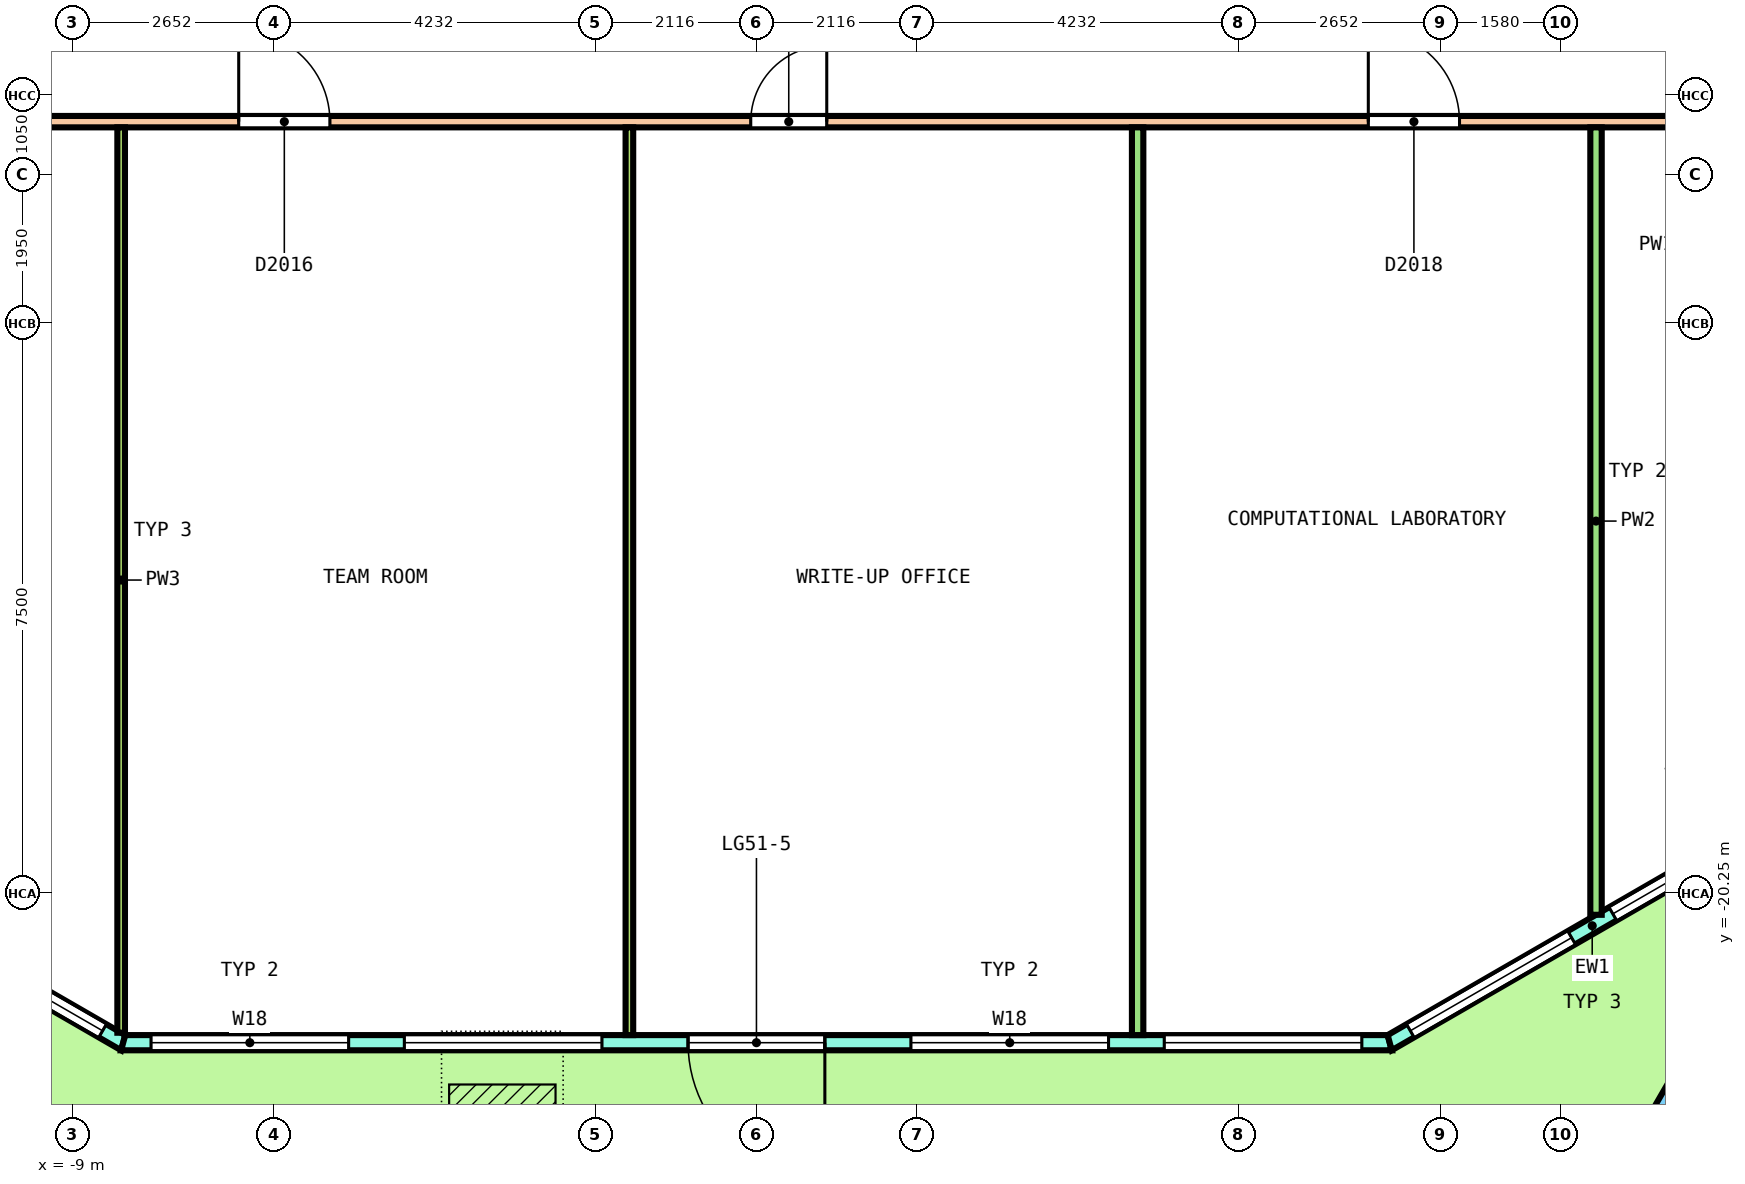
"""IFC4 building model, lengths in metres.
Left out: names, types, materials, properties, quantities, classifications, styles, units other than length and angle.
Written with IfcOpenShell. Run it as: python <this file> out.ifc"""

import sys

from ifc_helpers import new_model, si_unit, direction, frame, frame_2d, origin, origin_2d, place, context, subcontext, project, spatial, polyline, rectangle, outline, extrude, element, fill, save


model = new_model("IFC4")
c1 = context("Model", 3, precision=1e-05, world=origin(), true_north=direction((0.0, 1.0)))
c2 = subcontext(c1, "Body", "Model", "MODEL_VIEW")
j1 = project(units=[si_unit("LENGTHUNIT", "METRE"), si_unit("PLANEANGLEUNIT", "RADIAN")], contexts=[c1])
p1 = place(None, origin())
s1 = spatial("IfcSite", under=j1, at=p1, CompositionType="ELEMENT")
p2 = place(p1, origin())
s2 = spatial("IfcBuilding", under=s1, at=p2, CompositionType="ELEMENT")
p3 = place(p2, frame((0.0, 0.0, 237.4)))
s3 = spatial("IfcBuildingStorey", under=s2, at=p3, CompositionType="ELEMENT", Elevation=237.4)
p4 = place(p3, frame((12.396, -23.104, 0.0), z_axis=(-0.018113955825, -0.03141534774, 0.999342263957), x_axis=(0.86551973078, 0.499889444942, 0.031402841694)))
e1 = element("IfcColumn", 1, at=p4, inside=s3, PredefinedType="COLUMN", context=c2, shape_type="SweptSolid", body=[
    extrude(rectangle(XDim=1.05, YDim=1.05, at=origin_2d()), origin(), (0.0, 0.0, 1.0), 3.653),
])
p5 = place(p3, frame((-13.66, -19.141, 0.0), z_axis=(0.0, 0.0, 1.0), x_axis=(0.866019727221, -0.500009831968, 0.0)))
e2 = element("IfcWall", 2, at=p5, inside=s3, PredefinedType="SOLIDWALL", context=c2, shape_type="SweptSolid", body=[
    extrude(outline(polyline([(-0.027, -0.1), (1.008, -0.1), (2.042, -0.1), (3.076, -0.1), (4.111, -0.1), (5.145, -0.1), (6.18, -0.1), (6.126, 0.1), (5.109, 0.1), (4.093, 0.1), (3.076, 0.1), (2.06, 0.1), (1.043, 0.1), (0.027, 0.1), (-0.027, -0.1)])), origin(), (0.0, 0.0, 1.0), 3.7),
])
p6 = place(p5, frame((0.313, 0.0, 0.1)))
e3 = element("IfcOpeningElement", 3, at=p6, cuts=e2, PredefinedType="OPENING", context=c2, shape_type="SweptSolid", body=[
    extrude(rectangle(XDim=2.45, YDim=2.65, at=frame_2d((1.225, 1.325))), frame((0.0, 0.11, 0.0), z_axis=(0.0, -1.0, 0.0), x_axis=(1.0, 0.0, 0.0)), (0.0, 0.0, 1.0), 0.22),
])
p7 = place(p5, frame((3.39, 0.0, 0.1)))
e4 = element("IfcOpeningElement", 4, at=p7, cuts=e2, PredefinedType="OPENING", context=c2, shape_type="SweptSolid", body=[
    extrude(rectangle(XDim=2.45, YDim=2.65, at=frame_2d((1.225, 1.325))), frame((0.0, 0.11, 0.0), z_axis=(0.0, -1.0, 0.0), x_axis=(1.0, 0.0, 0.0)), (0.0, 0.0, 1.0), 0.22),
])
p8 = place(p3, frame((-8.331, -22.217, 0.0), z_axis=(0.0, 0.0, 1.0), x_axis=(1.0, 0.0, 0.0)))
e5 = element("IfcWall", 5, at=p8, inside=s3, PredefinedType="SOLIDWALL", context=c2, shape_type="SweptSolid", body=[
    extrude(outline(polyline([(-0.027, -0.1), (1.018, -0.1), (2.063, -0.1), (3.107, -0.1), (4.152, -0.1), (5.197, -0.1), (6.242, -0.1), (7.287, -0.1), (8.331, -0.1), (9.376, -0.1), (10.421, -0.1), (11.466, -0.1), (12.51, -0.1), (13.555, -0.1), (14.6, -0.1), (15.645, -0.1), (16.689, -0.1), (16.636, 0.1), (15.598, 0.1), (14.56, 0.1), (13.521, 0.1), (12.483, 0.1), (11.446, 0.1), (10.407, 0.1), (9.369, 0.1), (8.331, 0.1), (7.293, 0.1), (6.255, 0.1), (5.217, 0.1), (4.179, 0.1), (3.141, 0.1), (2.103, 0.1), (1.065, 0.1), (0.027, 0.1), (-0.027, -0.1)])), origin(), (0.0, 0.0, 1.0), 3.7),
])
p9 = place(p8, frame((0.366, 0.0, 0.1)))
e6 = element("IfcOpeningElement", 6, at=p9, cuts=e5, PredefinedType="OPENING", context=c2, shape_type="SweptSolid", body=[
    extrude(rectangle(XDim=2.6, YDim=2.65, at=frame_2d((1.3, 1.325))), frame((0.0, 0.11, 0.0), z_axis=(0.0, -1.0, 0.0), x_axis=(1.0, 0.0, 0.0)), (0.0, 0.0, 1.0), 0.22),
])
p10 = place(p8, frame((3.699, 0.0, 0.1)))
e7 = element("IfcOpeningElement", 7, at=p10, cuts=e5, PredefinedType="OPENING", context=c2, shape_type="SweptSolid", body=[
    extrude(rectangle(XDim=2.6, YDim=2.65, at=frame_2d((1.3, 1.325))), frame((0.0, 0.11, 0.0), z_axis=(0.0, -1.0, 0.0), x_axis=(1.0, 0.0, 0.0)), (0.0, 0.0, 1.0), 0.22),
])
p11 = place(p8, frame((7.431, 0.0, 0.0)))
e8 = element("IfcOpeningElement", 8, at=p11, cuts=e5, PredefinedType="OPENING", context=c2, shape_type="SweptSolid", body=[
    extrude(rectangle(XDim=1.8, YDim=2.4, at=frame_2d((0.9, 1.2))), frame((0.0, 0.11, 0.0), z_axis=(0.0, -1.0, 0.0), x_axis=(1.0, 0.0, 0.0)), (0.0, 0.0, 1.0), 0.22),
])
p12 = place(p8, frame((7.431, 0.0, 2.55)))
e9 = element("IfcOpeningElement", 9, at=p12, cuts=e5, PredefinedType="OPENING", context=c2, shape_type="SweptSolid", body=[
    extrude(rectangle(XDim=1.8, YDim=0.2, at=frame_2d((0.9, 0.1))), frame((0.0, 0.11, 0.0), z_axis=(0.0, -1.0, 0.0), x_axis=(1.0, 0.0, 0.0)), (0.0, 0.0, 1.0), 0.22),
])
p13 = place(p8, frame((10.364, 0.0, 0.1)))
e10 = element("IfcOpeningElement", 10, at=p13, cuts=e5, PredefinedType="OPENING", context=c2, shape_type="SweptSolid", body=[
    extrude(rectangle(XDim=2.6, YDim=2.65, at=frame_2d((1.3, 1.325))), frame((0.0, 0.11, 0.0), z_axis=(0.0, -1.0, 0.0), x_axis=(1.0, 0.0, 0.0)), (0.0, 0.0, 1.0), 0.22),
])
p14 = place(p8, frame((13.696, 0.0, 0.1)))
e11 = element("IfcOpeningElement", 11, at=p14, cuts=e5, PredefinedType="OPENING", context=c2, shape_type="SweptSolid", body=[
    extrude(rectangle(XDim=2.6, YDim=2.65, at=frame_2d((1.3, 1.325))), frame((0.0, 0.11, 0.0), z_axis=(0.0, -1.0, 0.0), x_axis=(1.0, 0.0, 0.0)), (0.0, 0.0, 1.0), 0.22),
])
p15 = place(p3, frame((8.331, -22.217, 0.0), z_axis=(0.0, 0.0, 1.0), x_axis=(0.866019727221, 0.500009831968, 0.0)))
e12 = element("IfcWall", 12, at=p15, inside=s3, PredefinedType="SOLIDWALL", context=c2, shape_type="SweptSolid", body=[
    extrude(outline(polyline([(-0.027, -0.1), (1.008, -0.1), (2.042, -0.1), (3.076, -0.1), (4.111, -0.1), (5.145, -0.1), (6.18, -0.1), (6.126, 0.1), (5.109, 0.1), (4.093, 0.1), (3.076, 0.1), (2.06, 0.1), (1.043, 0.1), (0.027, 0.1), (-0.027, -0.1)])), origin(), (0.0, 0.0, 1.0), 3.7),
])
p16 = place(p15, frame((0.313, 0.0, 0.1)))
e13 = element("IfcOpeningElement", 13, at=p16, cuts=e12, PredefinedType="OPENING", context=c2, shape_type="SweptSolid", body=[
    extrude(rectangle(XDim=2.45, YDim=2.65, at=frame_2d((1.225, 1.325))), frame((0.0, 0.11, 0.0), z_axis=(0.0, -1.0, 0.0), x_axis=(1.0, 0.0, 0.0)), (0.0, 0.0, 1.0), 0.22),
])
p17 = place(p15, frame((3.39, 0.0, 0.1)))
e14 = element("IfcOpeningElement", 14, at=p17, cuts=e12, PredefinedType="OPENING", context=c2, shape_type="SweptSolid", body=[
    extrude(rectangle(XDim=2.45, YDim=2.65, at=frame_2d((1.225, 1.325))), frame((0.0, 0.11, 0.0), z_axis=(0.0, -1.0, 0.0), x_axis=(1.0, 0.0, 0.0)), (0.0, 0.0, 1.0), 0.22),
])
p18 = place(p3, frame((-15.275, -10.1, 0.0), z_axis=(0.0, 0.0, 1.0), x_axis=(1.0, 0.0, 0.0)))
e15 = element("IfcWall", 15, at=p18, inside=s3, PredefinedType="PARTITIONING", context=c2, shape_type="SweptSolid", body=[
    extrude(rectangle(XDim=30.55, YDim=0.15, at=frame_2d((15.275, 0.0))), origin(), (0.0, 0.0, 1.0), 2.8),
])
p19 = place(p18, frame((3.108, 0.0, 0.0)))
e16 = element("IfcOpeningElement", 16, at=p19, cuts=e15, PredefinedType="OPENING", context=c2, shape_type="SweptSolid", body=[
    extrude(rectangle(XDim=1.2, YDim=2.1, at=frame_2d((0.6, 1.05))), frame((0.0, 0.085, 0.0), z_axis=(0.0, -1.0, 0.0), x_axis=(1.0, 0.0, 0.0)), (0.0, 0.0, 1.0), 0.17),
])
p20 = place(p18, frame((8.464, 0.0, 0.0)))
e17 = element("IfcOpeningElement", 17, at=p20, cuts=e15, PredefinedType="OPENING", context=c2, shape_type="SweptSolid", body=[
    extrude(rectangle(XDim=1.2, YDim=2.1, at=frame_2d((0.6, 1.05))), frame((0.0, 0.085, 0.0), z_axis=(0.0, -1.0, 0.0), x_axis=(1.0, 0.0, 0.0)), (0.0, 0.0, 1.0), 0.17),
])
p21 = place(p18, frame((15.2, 0.0, 0.0)))
e18 = element("IfcOpeningElement", 18, at=p21, cuts=e15, PredefinedType="OPENING", context=c2, shape_type="SweptSolid", body=[
    extrude(rectangle(XDim=1.0, YDim=2.1, at=frame_2d((0.5, 1.05))), frame((0.0, 0.085, 0.0), z_axis=(0.0, -1.0, 0.0), x_axis=(1.0, 0.0, 0.0)), (0.0, 0.0, 1.0), 0.17),
])
p22 = place(p18, frame((23.325, 0.0, 0.0)))
e19 = element("IfcOpeningElement", 19, at=p22, cuts=e15, PredefinedType="OPENING", context=c2, shape_type="SweptSolid", body=[
    extrude(rectangle(XDim=1.2, YDim=2.1, at=frame_2d((0.6, 1.05))), frame((0.0, 0.085, 0.0), z_axis=(0.0, -1.0, 0.0), x_axis=(1.0, 0.0, 0.0)), (0.0, 0.0, 1.0), 0.17),
])
p23 = place(p18, frame((28.511, 0.0, 0.0)))
e20 = element("IfcOpeningElement", 20, at=p23, cuts=e15, PredefinedType="OPENING", context=c2, shape_type="SweptSolid", body=[
    extrude(rectangle(XDim=1.0, YDim=2.1, at=frame_2d((0.5, 1.05))), frame((0.0, 0.085, 0.0), z_axis=(0.0, -1.0, 0.0), x_axis=(1.0, 0.0, 0.0)), (0.0, 0.0, 1.0), 0.17),
])
p24 = place(p3, frame((5.015, -22.117, 0.0), z_axis=(0.0, 0.0, 1.0), x_axis=(0.0, 1.0, 0.0)))
e21 = element("IfcWall", 21, at=p24, inside=s3, PredefinedType="PARTITIONING", context=c2, shape_type="SweptSolid", body=[
    extrude(rectangle(XDim=11.942, YDim=0.15, at=frame_2d((5.971, 0.0))), origin(), (0.0, 0.0, 1.0), 2.8),
])
p25 = place(p3, frame((11.045, -20.534, 0.0), z_axis=(0.0, 0.0, 1.0), x_axis=(0.0, 1.0, 0.0)))
e22 = element("IfcWall", 22, at=p25, inside=s3, PredefinedType="PARTITIONING", context=c2, shape_type="SweptSolid", body=[
    extrude(rectangle(XDim=10.359, YDim=0.15, at=frame_2d((5.18, 0.0))), origin(), (0.0, 0.0, 1.0), 2.8),
])
p26 = place(p3, frame((-8.358, -22.086, 0.0), z_axis=(0.0, 0.0, 1.0), x_axis=(0.0, 1.0, 0.0)))
e23 = element("IfcWall", 23, at=p26, inside=s3, PredefinedType="PARTITIONING", context=c2, shape_type="SweptSolid", body=[
    extrude(rectangle(XDim=11.911, YDim=0.1, at=frame_2d((5.956, 0.0))), origin(), (0.0, 0.0, 1.0), 2.8),
])
p27 = place(p3, frame((-1.672, -22.117, 0.0), z_axis=(0.0, 0.0, 1.0), x_axis=(0.0, 1.0, 0.0)))
e24 = element("IfcWall", 24, at=p27, inside=s3, PredefinedType="PARTITIONING", context=c2, shape_type="SweptSolid", body=[
    extrude(rectangle(XDim=11.942, YDim=0.1, at=frame_2d((5.971, 0.0))), origin(), (0.0, 0.0, 1.0), 2.8),
])
p28 = place(p7, origin())
e25 = element("IfcWindow", 25, at=p28, inside=s3, PartitioningType="SINGLE_PANEL", PredefinedType="WINDOW", context=c2, shape_type="SweptSolid", body=[
    extrude(rectangle(XDim=2.45, YDim=2.65, at=frame_2d((1.225, 1.325))), frame((0.0, 0.03, 0.0), z_axis=(0.0, -1.0, 0.0), x_axis=(1.0, 0.0, 0.0)), (0.0, 0.0, 1.0), 0.06),
])
fill(e4, e25)
p29 = place(p9, origin())
e26 = element("IfcWindow", 26, at=p29, inside=s3, PartitioningType="SINGLE_PANEL", PredefinedType="WINDOW", context=c2, shape_type="SweptSolid", body=[
    extrude(rectangle(XDim=2.6, YDim=2.65, at=frame_2d((1.3, 1.325))), frame((0.0, 0.03, 0.0), z_axis=(0.0, -1.0, 0.0), x_axis=(1.0, 0.0, 0.0)), (0.0, 0.0, 1.0), 0.06),
])
fill(e6, e26)
p30 = place(p10, origin())
e27 = element("IfcWindow", 27, at=p30, inside=s3, PartitioningType="SINGLE_PANEL", PredefinedType="WINDOW", context=c2, shape_type="SweptSolid", body=[
    extrude(rectangle(XDim=2.6, YDim=2.65, at=frame_2d((1.3, 1.325))), frame((0.0, 0.03, 0.0), z_axis=(0.0, -1.0, 0.0), x_axis=(1.0, 0.0, 0.0)), (0.0, 0.0, 1.0), 0.06),
])
fill(e7, e27)
p31 = place(p11, origin())
e28 = element("IfcDoor", 28, at=p31, inside=s3, OperationType="DOUBLE_DOOR_SINGLE_SWING", PredefinedType="DOOR", context=c2, shape_type="SweptSolid", body=[
    extrude(rectangle(XDim=1.8, YDim=2.4, at=frame_2d((0.9, 1.2))), frame((0.0, 0.025, 0.0), z_axis=(0.0, -1.0, 0.0), x_axis=(1.0, 0.0, 0.0)), (0.0, 0.0, 1.0), 0.05),
])
fill(e8, e28)
p32 = place(p12, origin())
e29 = element("IfcWindow", 29, at=p32, inside=s3, PartitioningType="SINGLE_PANEL", PredefinedType="WINDOW", context=c2, shape_type="SweptSolid", body=[
    extrude(rectangle(XDim=1.8, YDim=0.2, at=frame_2d((0.9, 0.1))), frame((0.0, 0.03, 0.0), z_axis=(0.0, -1.0, 0.0), x_axis=(1.0, 0.0, 0.0)), (0.0, 0.0, 1.0), 0.06),
])
fill(e9, e29)
p33 = place(p13, origin())
e30 = element("IfcWindow", 30, at=p33, inside=s3, PartitioningType="SINGLE_PANEL", PredefinedType="WINDOW", context=c2, shape_type="SweptSolid", body=[
    extrude(rectangle(XDim=2.6, YDim=2.65, at=frame_2d((1.3, 1.325))), frame((0.0, 0.03, 0.0), z_axis=(0.0, -1.0, 0.0), x_axis=(1.0, 0.0, 0.0)), (0.0, 0.0, 1.0), 0.06),
])
fill(e10, e30)
p34 = place(p14, origin())
e31 = element("IfcWindow", 31, at=p34, inside=s3, PartitioningType="SINGLE_PANEL", PredefinedType="WINDOW", context=c2, shape_type="SweptSolid", body=[
    extrude(rectangle(XDim=2.6, YDim=2.65, at=frame_2d((1.3, 1.325))), frame((0.0, 0.03, 0.0), z_axis=(0.0, -1.0, 0.0), x_axis=(1.0, 0.0, 0.0)), (0.0, 0.0, 1.0), 0.06),
])
fill(e11, e31)
p35 = place(p16, origin())
e32 = element("IfcWindow", 32, at=p35, inside=s3, PartitioningType="SINGLE_PANEL", PredefinedType="WINDOW", context=c2, shape_type="SweptSolid", body=[
    extrude(rectangle(XDim=2.45, YDim=2.65, at=frame_2d((1.225, 1.325))), frame((0.0, 0.03, 0.0), z_axis=(0.0, -1.0, 0.0), x_axis=(1.0, 0.0, 0.0)), (0.0, 0.0, 1.0), 0.06),
])
fill(e13, e32)
p36 = place(p17, origin())
e33 = element("IfcWindow", 33, at=p36, inside=s3, PartitioningType="SINGLE_PANEL", PredefinedType="WINDOW", context=c2, shape_type="SweptSolid", body=[
    extrude(rectangle(XDim=2.45, YDim=2.65, at=frame_2d((1.225, 1.325))), frame((0.0, 0.03, 0.0), z_axis=(0.0, -1.0, 0.0), x_axis=(1.0, 0.0, 0.0)), (0.0, 0.0, 1.0), 0.06),
])
fill(e14, e33)
p37 = place(p20, origin())
e34 = element("IfcDoor", 34, at=p37, inside=s3, OperationType="DOUBLE_DOOR_SINGLE_SWING", PredefinedType="DOOR", context=c2, shape_type="SweptSolid", body=[
    extrude(rectangle(XDim=1.2, YDim=2.1, at=frame_2d((0.6, 1.05))), frame((0.0, 0.025, 0.0), z_axis=(0.0, -1.0, 0.0), x_axis=(1.0, 0.0, 0.0)), (0.0, 0.0, 1.0), 0.05),
])
fill(e17, e34)
p38 = place(p21, origin())
e35 = element("IfcDoor", 35, at=p38, inside=s3, OperationType="SINGLE_SWING_RIGHT", PredefinedType="DOOR", context=c2, shape_type="SweptSolid", body=[
    extrude(rectangle(XDim=1.0, YDim=2.1, at=frame_2d((0.5, 1.05))), frame((0.0, 0.025, 0.0), z_axis=(0.0, -1.0, 0.0), x_axis=(1.0, 0.0, 0.0)), (0.0, 0.0, 1.0), 0.05),
])
fill(e18, e35)
p39 = place(p22, origin())
e36 = element("IfcDoor", 36, at=p39, inside=s3, OperationType="DOUBLE_DOOR_SINGLE_SWING", PredefinedType="DOOR", context=c2, shape_type="SweptSolid", body=[
    extrude(rectangle(XDim=1.2, YDim=2.1, at=frame_2d((0.6, 1.05))), frame((0.0, 0.025, 0.0), z_axis=(0.0, -1.0, 0.0), x_axis=(1.0, 0.0, 0.0)), (0.0, 0.0, 1.0), 0.05),
])
fill(e19, e36)
save(model, sys.argv[1])
